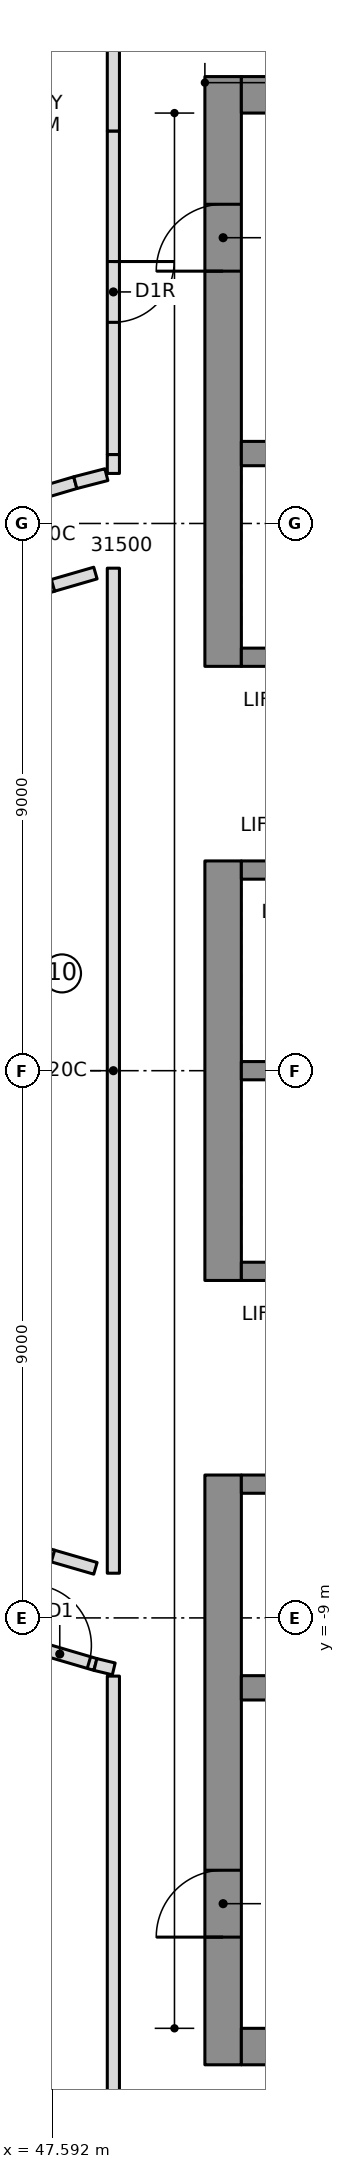
"""IFC4 building model, lengths in metres.
Left out: names, types, materials, properties, quantities, classifications, styles, units other than length and angle.
Written with IfcOpenShell. Run it as: python <this file> out.ifc"""

import sys

from ifc_helpers import new_model, si_unit, direction, frame, frame_2d, origin, place, context, subcontext, project, spatial, rectangle, extrude, element, fill, save


model = new_model("IFC4")
c1 = context("Model", 3, precision=1e-05, world=origin(), true_north=direction((0.0, 1.0)))
c2 = subcontext(c1, "Body", "Model", "MODEL_VIEW")
j1 = project(units=[si_unit("LENGTHUNIT", "METRE"), si_unit("PLANEANGLEUNIT", "RADIAN")], contexts=[c1])
p1 = place(None, origin())
s1 = spatial("IfcSite", under=j1, at=p1, CompositionType="ELEMENT")
p2 = place(p1, origin())
s2 = spatial("IfcBuilding", under=s1, at=p2, CompositionType="ELEMENT")
p3 = place(p2, frame((0.0, 0.0, 220.8)))
s3 = spatial("IfcBuildingStorey", under=s2, at=p3, CompositionType="ELEMENT", Elevation=220.8)
p4 = place(p3, frame((50.4, 6.65, 0.0), z_axis=(0.0, 0.0, 1.0), x_axis=(0.0, 1.0, 0.0)))
e1 = element("IfcWall", 1, at=p4, inside=s3, PredefinedType="SHEAR", context=c2, shape_type="SweptSolid", body=[
    extrude(rectangle(XDim=9.7, YDim=0.6, at=frame_2d((4.85, 0.0))), origin(), (0.0, 0.0, 1.0), 3.55),
])
p5 = place(p4, frame((6.5, 0.0, 0.0)))
e2 = element("IfcOpeningElement", 2, at=p5, cuts=e1, PredefinedType="OPENING", context=c2, shape_type="SweptSolid", body=[
    extrude(rectangle(XDim=1.1, YDim=2.1, at=frame_2d((0.55, 1.05))), frame((0.0, 0.31, 0.0), z_axis=(0.0, -1.0, 0.0), x_axis=(1.0, 0.0, 0.0)), (0.0, 0.0, 1.0), 0.62),
])
p6 = place(p3, frame((50.4, -3.45, 0.0), z_axis=(0.0, 0.0, 1.0), x_axis=(0.0, 1.0, 0.0)))
e3 = element("IfcWall", 3, at=p6, inside=s3, PredefinedType="SHEAR", context=c2, shape_type="SweptSolid", body=[
    extrude(rectangle(XDim=6.9, YDim=0.6, at=frame_2d((3.45, 0.0))), origin(), (0.0, 0.0, 1.0), 3.55),
])
p7 = place(p3, frame((50.4, -16.35, 0.0), z_axis=(0.0, 0.0, 1.0), x_axis=(0.0, 1.0, 0.0)))
e4 = element("IfcWall", 4, at=p7, inside=s3, PredefinedType="SHEAR", context=c2, shape_type="SweptSolid", body=[
    extrude(rectangle(XDim=9.7, YDim=0.6, at=frame_2d((4.85, 0.0))), origin(), (0.0, 0.0, 1.0), 3.55),
])
p8 = place(p7, frame((2.1, 0.0, 0.0)))
e5 = element("IfcOpeningElement", 5, at=p8, cuts=e4, PredefinedType="OPENING", context=c2, shape_type="SweptSolid", body=[
    extrude(rectangle(XDim=1.1, YDim=2.1, at=frame_2d((0.55, 1.05))), frame((0.0, 0.31, 0.0), z_axis=(0.0, -1.0, 0.0), x_axis=(1.0, 0.0, 0.0)), (0.0, 0.0, 1.0), 0.62),
])
for number, where, z_axis, x_axis in (
    (6, (50.7, 16.05, 0.0), (0.0, 0.0, 1.0), (1.0, 0.0, 0.0)),
    (7, (50.7, -16.05, 0.0), (0.0, 0.0, 1.0), (1.0, 0.0, 0.0)),
):
    element("IfcWall", number, at=place(p3, frame(where, z_axis=z_axis, x_axis=x_axis)), inside=s3, PredefinedType="SHEAR", context=c2, shape_type="SweptSolid", body=[
        extrude(rectangle(XDim=13.62, YDim=0.6, at=frame_2d((6.81, 0.0))), origin(), (0.0, 0.0, 1.0), 3.55),
    ])
p9 = place(p3, frame((50.7, 10.15, 0.0), z_axis=(0.0, 0.0, 1.0), x_axis=(1.0, 0.0, 0.0)))
e8 = element("IfcWall", 8, at=p9, inside=s3, PredefinedType="SHEAR", context=c2, shape_type="SweptSolid", body=[
    extrude(rectangle(XDim=13.02, YDim=0.4, at=frame_2d((6.51, 0.0))), origin(), (0.0, 0.0, 1.0), 3.55),
])
p10 = place(p9, frame((0.7, 0.0, 0.0)))
e9 = element("IfcOpeningElement", 9, at=p10, cuts=e8, PredefinedType="OPENING", context=c2, shape_type="SweptSolid", body=[
    extrude(rectangle(XDim=1.1, YDim=2.1, at=frame_2d((0.55, 1.05))), frame((0.0, 0.21, 0.0), z_axis=(0.0, -1.0, 0.0), x_axis=(1.0, 0.0, 0.0)), (0.0, 0.0, 1.0), 0.42),
])
p11 = place(p9, frame((3.5, 0.0, 0.0)))
e10 = element("IfcOpeningElement", 10, at=p11, cuts=e8, PredefinedType="OPENING", context=c2, shape_type="SweptSolid", body=[
    extrude(rectangle(XDim=1.1, YDim=2.1, at=frame_2d((0.55, 1.05))), frame((0.0, 0.21, 0.0), z_axis=(0.0, -1.0, 0.0), x_axis=(1.0, 0.0, 0.0)), (0.0, 0.0, 1.0), 0.42),
])
p12 = place(p3, frame((50.7, -10.15, 0.0), z_axis=(0.0, 0.0, 1.0), x_axis=(1.0, 0.0, 0.0)))
e11 = element("IfcWall", 11, at=p12, inside=s3, PredefinedType="SHEAR", context=c2, shape_type="SweptSolid", body=[
    extrude(rectangle(XDim=13.02, YDim=0.4, at=frame_2d((6.51, 0.0))), origin(), (0.0, 0.0, 1.0), 3.55),
])
p13 = place(p3, frame((50.7, 0.0, 0.0), z_axis=(0.0, 0.0, 1.0), x_axis=(1.0, 0.0, 0.0)))
e12 = element("IfcWall", 12, at=p13, inside=s3, PredefinedType="SHEAR", context=c2, shape_type="SweptSolid", body=[
    extrude(rectangle(XDim=10.9, YDim=0.3, at=frame_2d((5.45, 0.0))), origin(), (0.0, 0.0, 1.0), 3.55),
])
p14 = place(p3, frame((50.7, 3.3, 0.0), z_axis=(0.0, 0.0, 1.0), x_axis=(1.0, 0.0, 0.0)))
e13 = element("IfcWall", 13, at=p14, inside=s3, PredefinedType="SHEAR", context=c2, shape_type="SweptSolid", body=[
    extrude(rectangle(XDim=10.9, YDim=0.3, at=frame_2d((5.45, 0.0))), origin(), (0.0, 0.0, 1.0), 3.55),
])
p15 = place(p14, frame((0.7, 0.0, 0.0)))
e14 = element("IfcOpeningElement", 14, at=p15, cuts=e13, PredefinedType="OPENING", context=c2, shape_type="SweptSolid", body=[
    extrude(rectangle(XDim=1.1, YDim=2.1, at=frame_2d((0.55, 1.05))), frame((0.0, 0.16, 0.0), z_axis=(0.0, -1.0, 0.0), x_axis=(1.0, 0.0, 0.0)), (0.0, 0.0, 1.0), 0.32),
])
p16 = place(p14, frame((3.5, 0.0, 0.0)))
e15 = element("IfcOpeningElement", 15, at=p16, cuts=e13, PredefinedType="OPENING", context=c2, shape_type="SweptSolid", body=[
    extrude(rectangle(XDim=1.1, YDim=2.1, at=frame_2d((0.55, 1.05))), frame((0.0, 0.16, 0.0), z_axis=(0.0, -1.0, 0.0), x_axis=(1.0, 0.0, 0.0)), (0.0, 0.0, 1.0), 0.32),
])
p17 = place(p3, frame((50.7, 6.8, 0.0), z_axis=(0.0, 0.0, 1.0), x_axis=(1.0, 0.0, 0.0)))
e16 = element("IfcWall", 16, at=p17, inside=s3, PredefinedType="SHEAR", context=c2, shape_type="SweptSolid", body=[
    extrude(rectangle(XDim=10.9, YDim=0.3, at=frame_2d((5.45, 0.0))), origin(), (0.0, 0.0, 1.0), 3.55),
])
p18 = place(p17, frame((6.4, 0.0, 0.0)))
e17 = element("IfcOpeningElement", 17, at=p18, cuts=e16, PredefinedType="OPENING", context=c2, shape_type="SweptSolid", body=[
    extrude(rectangle(XDim=0.9, YDim=2.1, at=frame_2d((0.45, 1.05))), frame((0.0, 0.16, 0.0), z_axis=(0.0, -1.0, 0.0), x_axis=(1.0, 0.0, 0.0)), (0.0, 0.0, 1.0), 0.32),
])
p19 = place(p17, frame((9.2, 0.0, 0.0)))
e18 = element("IfcOpeningElement", 18, at=p19, cuts=e16, PredefinedType="OPENING", context=c2, shape_type="SweptSolid", body=[
    extrude(rectangle(XDim=0.9, YDim=2.1, at=frame_2d((0.45, 1.05))), frame((0.0, 0.16, 0.0), z_axis=(0.0, -1.0, 0.0), x_axis=(1.0, 0.0, 0.0)), (0.0, 0.0, 1.0), 0.32),
])
p20 = place(p3, frame((50.7, -3.3, 0.0), z_axis=(0.0, 0.0, 1.0), x_axis=(1.0, 0.0, 0.0)))
e19 = element("IfcWall", 19, at=p20, inside=s3, PredefinedType="SHEAR", context=c2, shape_type="SweptSolid", body=[
    extrude(rectangle(XDim=10.9, YDim=0.3, at=frame_2d((5.45, 0.0))), origin(), (0.0, 0.0, 1.0), 3.55),
])
p21 = place(p20, frame((9.1, 0.0, 0.0)))
e20 = element("IfcOpeningElement", 20, at=p21, cuts=e19, PredefinedType="OPENING", context=c2, shape_type="SweptSolid", body=[
    extrude(rectangle(XDim=1.1, YDim=2.1, at=frame_2d((0.55, 1.05))), frame((0.0, 0.16, 0.0), z_axis=(0.0, -1.0, 0.0), x_axis=(1.0, 0.0, 0.0)), (0.0, 0.0, 1.0), 0.32),
])
p22 = place(p3, frame((50.7, -6.8, 0.0), z_axis=(0.0, 0.0, 1.0), x_axis=(1.0, 0.0, 0.0)))
e21 = element("IfcWall", 21, at=p22, inside=s3, PredefinedType="SHEAR", context=c2, shape_type="SweptSolid", body=[
    extrude(rectangle(XDim=10.9, YDim=0.3, at=frame_2d((5.45, 0.0))), origin(), (0.0, 0.0, 1.0), 3.55),
])
p23 = place(p22, frame((6.3, 0.0, 0.0)))
e22 = element("IfcOpeningElement", 22, at=p23, cuts=e21, PredefinedType="OPENING", context=c2, shape_type="SweptSolid", body=[
    extrude(rectangle(XDim=1.1, YDim=2.1, at=frame_2d((0.55, 1.05))), frame((0.0, 0.16, 0.0), z_axis=(0.0, -1.0, 0.0), x_axis=(1.0, 0.0, 0.0)), (0.0, 0.0, 1.0), 0.32),
])
p24 = place(p22, frame((9.1, 0.0, 0.0)))
e23 = element("IfcOpeningElement", 23, at=p24, cuts=e21, PredefinedType="OPENING", context=c2, shape_type="SweptSolid", body=[
    extrude(rectangle(XDim=1.1, YDim=2.1, at=frame_2d((0.55, 1.05))), frame((0.0, 0.16, 0.0), z_axis=(0.0, -1.0, 0.0), x_axis=(1.0, 0.0, 0.0)), (0.0, 0.0, 1.0), 0.32),
])
p25 = place(p22, frame((0.8, 0.0, 0.0)))
e24 = element("IfcOpeningElement", 24, at=p25, cuts=e21, PredefinedType="OPENING", context=c2, shape_type="SweptSolid", body=[
    extrude(rectangle(XDim=0.9, YDim=2.1, at=frame_2d((0.45, 1.05))), frame((0.0, 0.16, 0.0), z_axis=(0.0, -1.0, 0.0), x_axis=(1.0, 0.0, 0.0)), (0.0, 0.0, 1.0), 0.32),
])
p26 = place(p22, frame((3.6, 0.0, 0.0)))
e25 = element("IfcOpeningElement", 25, at=p26, cuts=e21, PredefinedType="OPENING", context=c2, shape_type="SweptSolid", body=[
    extrude(rectangle(XDim=0.9, YDim=2.1, at=frame_2d((0.45, 1.05))), frame((0.0, 0.16, 0.0), z_axis=(0.0, -1.0, 0.0), x_axis=(1.0, 0.0, 0.0)), (0.0, 0.0, 1.0), 0.32),
])
p27 = place(p3, frame((47.969, 9.671, 0.0), z_axis=(0.0, 0.0, 1.0), x_axis=(-0.958867721668, -0.283853293696, 0.0)))
e26 = element("IfcWall", 26, at=p27, inside=s3, PredefinedType="PARTITIONING", context=c2, shape_type="SweptSolid", body=[
    extrude(rectangle(XDim=1.167, YDim=0.2, at=frame_2d((0.583, 0.0))), origin(), (0.0, 0.0, 1.0), 3.25),
])
for number, where, z_axis, x_axis in (
    (27, (46.85, 7.748, 0.0), (0.0, 0.0, 1.0), (0.955, 0.298, 0.0)),
    (28, (47.602, -7.982, 0.0), (0.0, 0.0, 1.0), (-0.955, 0.298, 0.0)),
):
    element("IfcWall", number, at=place(p3, frame(where, z_axis=z_axis, x_axis=x_axis)), inside=s3, PredefinedType="PARTITIONING", context=c2, shape_type="SweptSolid", body=[
        extrude(rectangle(XDim=0.788, YDim=0.2, at=frame_2d((0.394, 0.0))), origin(), (0.0, 0.0, 1.0), 3.25),
    ])
p28 = place(p3, frame((46.85, -9.34, 0.0), z_axis=(0.0, 0.0, 1.0), x_axis=(0.95944263903, -0.281903924079, 0.0)))
e29 = element("IfcWall", 29, at=p28, inside=s3, PredefinedType="PARTITIONING", context=c2, shape_type="SweptSolid", body=[
    extrude(rectangle(XDim=1.511, YDim=0.2, at=frame_2d((0.756, 0.0))), origin(), (0.0, 0.0, 1.0), 3.25),
])
p29 = place(p28, frame((0.4, 0.0, 0.0)))
e30 = element("IfcOpeningElement", 30, at=p29, cuts=e29, PredefinedType="OPENING", context=c2, shape_type="SweptSolid", body=[
    extrude(rectangle(XDim=1.0, YDim=2.1, at=frame_2d((0.5, 1.05))), frame((0.0, 0.11, 0.0), z_axis=(0.0, -1.0, 0.0), x_axis=(1.0, 0.0, 0.0)), (0.0, 0.0, 1.0), 0.22),
])
for number, where, z_axis, x_axis in (
    (31, (47.602, 7.982, 0.0), (0.0, 0.0, 1.0), (0.96, 0.278, 0.0)),
    (32, (48.3, -8.185, 0.0), (0.0, 0.0, 1.0), (-0.96, 0.278, 0.0)),
):
    element("IfcWall", number, at=place(p3, frame(where, z_axis=z_axis, x_axis=x_axis)), inside=s3, PredefinedType="PARTITIONING", context=c2, shape_type="SweptSolid", body=[
        extrude(rectangle(XDim=0.727, YDim=0.2, at=frame_2d((0.363, 0.0))), origin(), (0.0, 0.0, 1.0), 3.25),
    ])
p30 = place(p3, frame((48.595, 15.455, 0.0), z_axis=(0.0, 0.0, 1.0), x_axis=(0.0, -1.0, 0.0)))
e33 = element("IfcWall", 33, at=p30, inside=s3, PredefinedType="PARTITIONING", context=c2, shape_type="SweptSolid", body=[
    extrude(rectangle(XDim=5.322, YDim=0.2, at=frame_2d((2.661, 0.0))), origin(), (0.0, 0.0, 1.0), 3.25),
])
p31 = place(p30, frame((2.147, 0.0, 0.0)))
e34 = element("IfcOpeningElement", 34, at=p31, cuts=e33, PredefinedType="OPENING", context=c2, shape_type="SweptSolid", body=[
    extrude(rectangle(XDim=1.0, YDim=2.1, at=frame_2d((0.5, 1.05))), frame((0.0, 0.11, 0.0), z_axis=(0.0, -1.0, 0.0), x_axis=(1.0, 0.0, 0.0)), (0.0, 0.0, 1.0), 0.22),
])
p32 = place(p3, frame((48.595, 8.265, 0.0), z_axis=(0.0, 0.0, 1.0), x_axis=(0.0, -1.0, 0.0)))
e35 = element("IfcWall", 35, at=p32, inside=s3, PredefinedType="PARTITIONING", context=c2, shape_type="SweptSolid", body=[
    extrude(rectangle(XDim=16.53, YDim=0.2, at=frame_2d((8.265, 0.0))), origin(), (0.0, 0.0, 1.0), 3.25),
])
p33 = place(p3, frame((48.595, 19.927, 0.0), z_axis=(0.0, 0.0, 1.0), x_axis=(0.0, -1.0, 0.0)))
e36 = element("IfcWall", 36, at=p33, inside=s3, PredefinedType="PARTITIONING", context=c2, shape_type="SweptSolid", body=[
    extrude(rectangle(XDim=4.472, YDim=0.2, at=frame_2d((2.236, 0.0))), origin(), (0.0, 0.0, 1.0), 3.25),
])
p34 = place(p3, frame((48.595, 10.133, 0.0), z_axis=(0.0, 0.0, 1.0), x_axis=(0.0, -1.0, 0.0)))
e37 = element("IfcWall", 37, at=p34, inside=s3, PredefinedType="PARTITIONING", context=c2, shape_type="SweptSolid", body=[
    extrude(rectangle(XDim=0.31, YDim=0.2, at=frame_2d((0.155, 0.0))), origin(), (0.0, 0.0, 1.0), 3.25),
])
p35 = place(p3, frame((48.48, 9.803, 0.0), z_axis=(0.0, 0.0, 1.0), x_axis=(-0.968262872428, -0.249934011047, 0.0)))
e38 = element("IfcWall", 38, at=p35, inside=s3, PredefinedType="PARTITIONING", context=c2, shape_type="SweptSolid", body=[
    extrude(rectangle(XDim=0.528, YDim=0.2, at=frame_2d((0.264, 0.0))), origin(), (0.0, 0.0, 1.0), 3.25),
])
p36 = place(p3, frame((48.3, -9.766, 0.0), z_axis=(0.0, 0.0, 1.0), x_axis=(0.972415906571, -0.233253734477, 0.0)))
e39 = element("IfcWall", 39, at=p36, inside=s3, PredefinedType="PARTITIONING", context=c2, shape_type="SweptSolid", body=[
    extrude(rectangle(XDim=0.31, YDim=0.2, at=frame_2d((0.155, 0.0))), origin(), (0.0, 0.0, 1.0), 3.25),
])
p37 = place(p3, frame((48.595, -9.957, 0.0), z_axis=(0.0, 0.0, 1.0), x_axis=(0.0, -1.0, 0.0)))
e40 = element("IfcWall", 40, at=p37, inside=s3, PredefinedType="PARTITIONING", context=c2, shape_type="SweptSolid", body=[
    extrude(rectangle(XDim=9.972, YDim=0.2, at=frame_2d((4.986, 0.0))), origin(), (0.0, 0.0, 1.0), 3.25),
])
p38 = place(p29, origin())
e41 = element("IfcDoor", 41, at=p38, inside=s3, OperationType="SINGLE_SWING_LEFT", PredefinedType="DOOR", context=c2, shape_type="SweptSolid", body=[
    extrude(rectangle(XDim=1.0, YDim=2.1, at=frame_2d((0.5, 1.05))), frame((0.0, 0.025, 0.0), z_axis=(0.0, -1.0, 0.0), x_axis=(1.0, 0.0, 0.0)), (0.0, 0.0, 1.0), 0.05),
])
fill(e30, e41)
p39 = place(p31, origin())
e42 = element("IfcDoor", 42, at=p39, inside=s3, OperationType="SINGLE_SWING_RIGHT", PredefinedType="DOOR", context=c2, shape_type="SweptSolid", body=[
    extrude(rectangle(XDim=1.0, YDim=2.1, at=frame_2d((0.5, 1.05))), frame((0.0, 0.025, 0.0), z_axis=(0.0, -1.0, 0.0), x_axis=(1.0, 0.0, 0.0)), (0.0, 0.0, 1.0), 0.05),
])
fill(e34, e42)
p40 = place(p5, origin())
e43 = element("IfcDoor", 43, at=p40, inside=s3, OperationType="SINGLE_SWING_RIGHT", PredefinedType="DOOR", context=c2, shape_type="SweptSolid", body=[
    extrude(rectangle(XDim=1.1, YDim=2.1, at=frame_2d((0.55, 1.05))), frame((0.0, 0.025, 0.0), z_axis=(0.0, -1.0, 0.0), x_axis=(1.0, 0.0, 0.0)), (0.0, 0.0, 1.0), 0.05),
])
fill(e2, e43)
p41 = place(p8, origin())
e44 = element("IfcDoor", 44, at=p41, inside=s3, OperationType="SINGLE_SWING_RIGHT", PredefinedType="DOOR", context=c2, shape_type="SweptSolid", body=[
    extrude(rectangle(XDim=1.1, YDim=2.1, at=frame_2d((0.55, 1.05))), frame((0.0, 0.025, 0.0), z_axis=(0.0, -1.0, 0.0), x_axis=(1.0, 0.0, 0.0)), (0.0, 0.0, 1.0), 0.05),
])
fill(e5, e44)
save(model, sys.argv[1])
